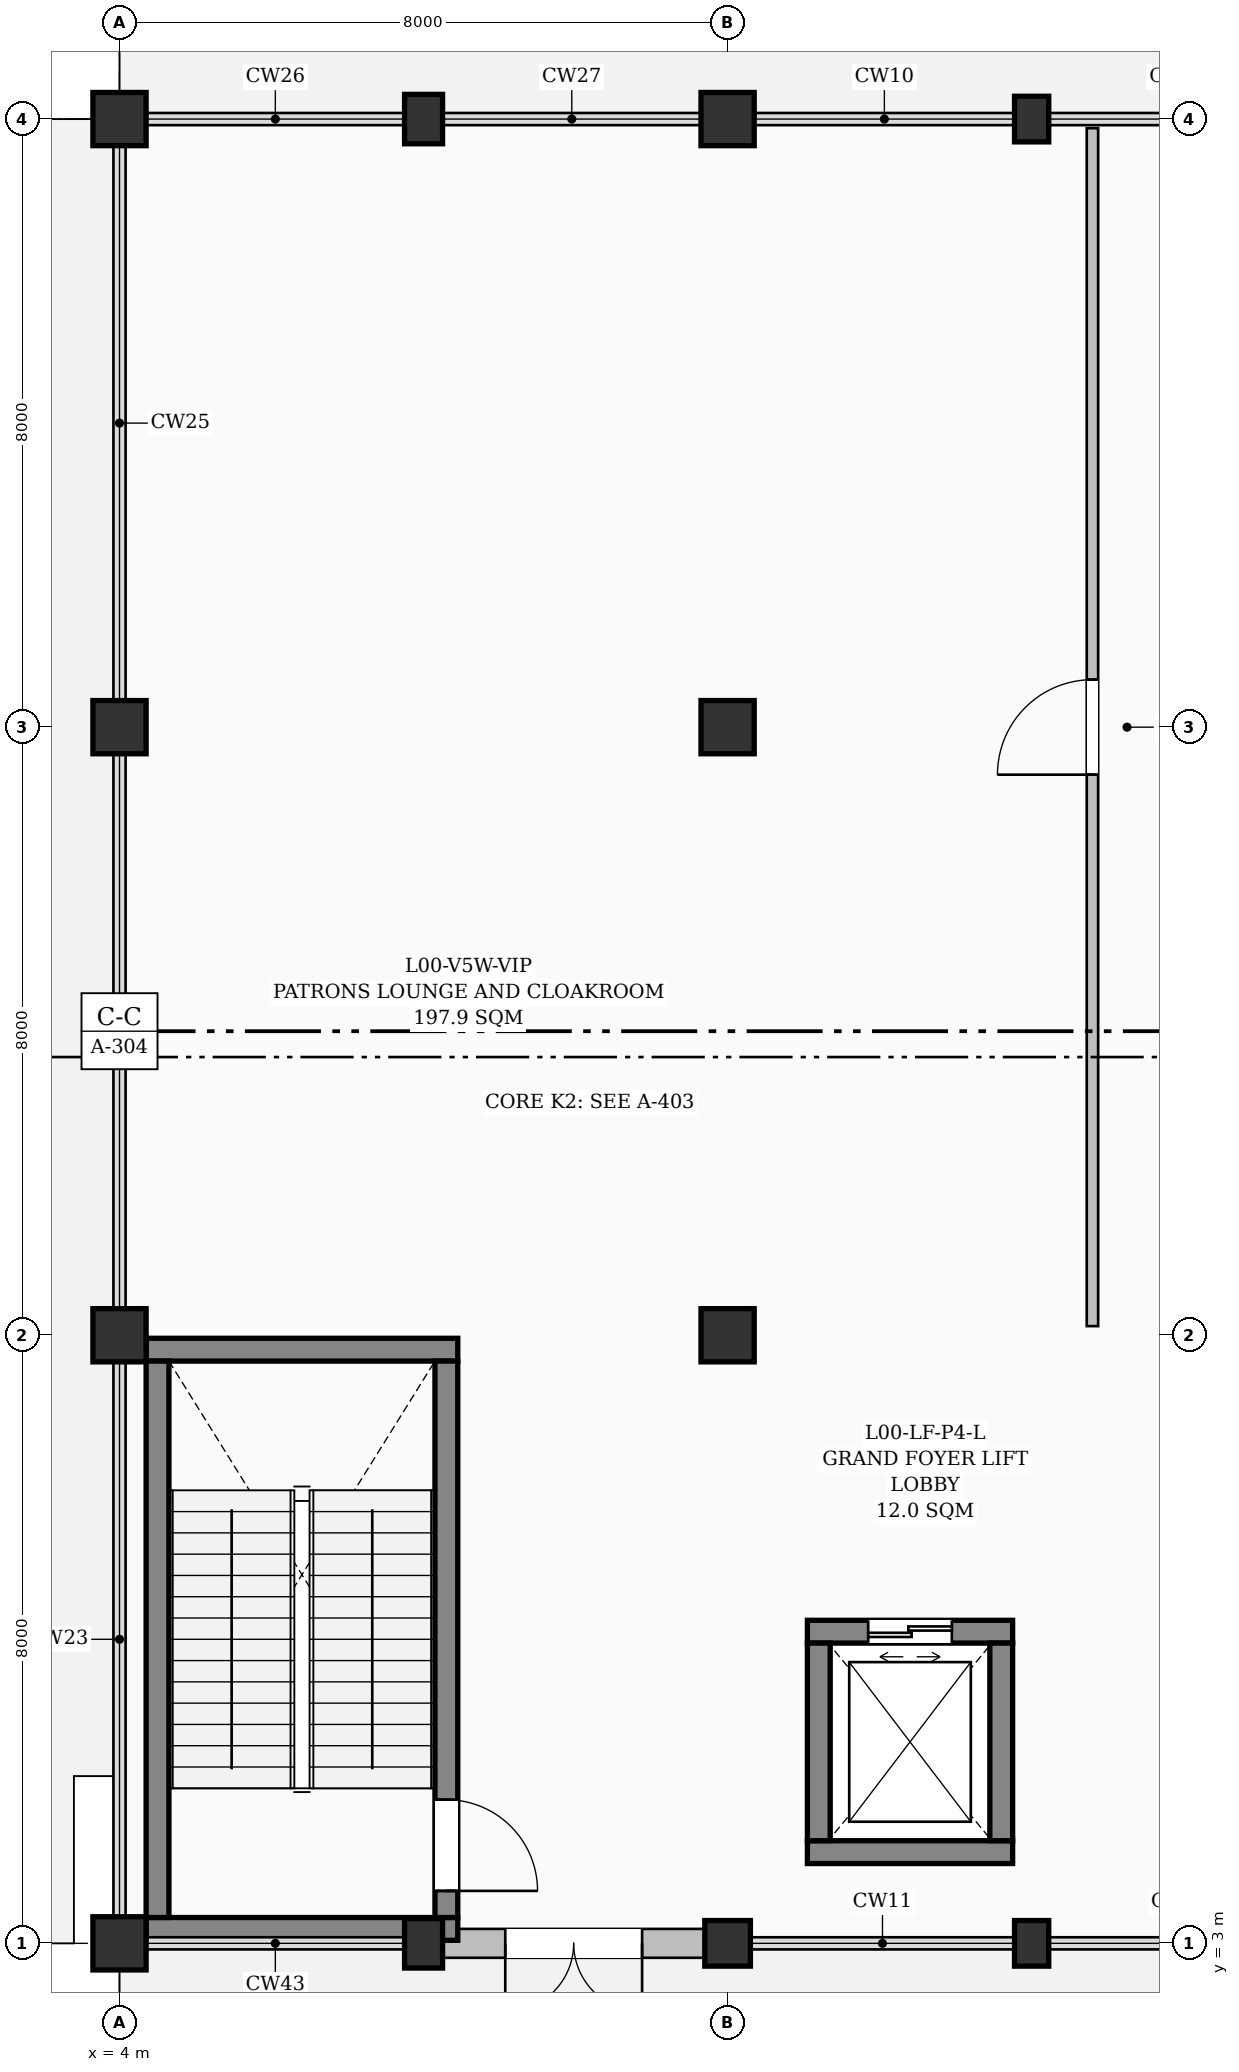
"""IFC4 building model, lengths in metres.
Left out: names, types, materials, properties, quantities, classifications, styles, units other than length and angle.
Written with IfcOpenShell. Run it as: python <this file> out.ifc"""

import sys

from ifc_helpers import new_model, si_unit, direction, frame, frame_2d, origin, origin_2d, place, context, subcontext, project, spatial, rectangle, circle, extrude, element, fill, save


model = new_model("IFC4")
c1 = context("Model", 3, precision=1e-05, world=origin(), true_north=direction((0.0, 1.0)))
c2 = subcontext(c1, "Body", "Model", "MODEL_VIEW")
j1 = project(units=[si_unit("LENGTHUNIT", "METRE"), si_unit("PLANEANGLEUNIT", "RADIAN")], contexts=[c1])
p1 = place(None, origin())
s1 = spatial("IfcSite", under=j1, at=p1, CompositionType="ELEMENT")
p2 = place(p1, origin())
s2 = spatial("IfcBuilding", under=s1, at=p2, CompositionType="ELEMENT")
p3 = place(p2, origin())
s3 = spatial("IfcBuildingStorey", under=s2, at=p3, CompositionType="ELEMENT", Elevation=0.0)
for number, where, z_axis, x_axis in (
    (1, (4.0, 3.0, 0.0), (0.0, 0.0, 1.0), (1.0, 0.0, 0.0)),
    (2, (4.0, 11.0, 0.0), (0.0, 0.0, 1.0), (1.0, 0.0, 0.0)),
    (3, (4.0, 19.0, 0.0), (0.0, 0.0, 1.0), (1.0, 0.0, 0.0)),
    (4, (4.0, 27.0, 0.0), (0.0, 0.0, 1.0), (1.0, 0.0, 0.0)),
):
    element("IfcColumn", number, at=place(p3, frame(where, z_axis=z_axis, x_axis=x_axis)), inside=s3, PredefinedType="COLUMN", context=c2, shape_type="SweptSolid", body=[
        extrude(rectangle(XDim=0.7, YDim=0.7, at=origin_2d()), origin(), (0.0, 0.0, 1.0), 4.8),
    ])
for number, where, z_axis, x_axis in (
    (5, (8.0, 3.0, 0.0), (0.0, 0.0, 1.0), (1.0, 0.0, 0.0)),
    (6, (8.0, 27.0, 0.0), (0.0, 0.0, 1.0), (1.0, 0.0, 0.0)),
):
    element("IfcColumn", number, at=place(p3, frame(where, z_axis=z_axis, x_axis=x_axis)), inside=s3, PredefinedType="PILASTER", context=c2, shape_type="SweptSolid", body=[
        extrude(rectangle(XDim=0.5, YDim=0.65, at=origin_2d()), origin(), (0.0, 0.0, 1.0), 4.8),
    ])
p4 = place(p3, frame((12.0, 3.0, 0.0), z_axis=(0.0, 0.0, 1.0), x_axis=(1.0, 0.0, 0.0)))
e7 = element("IfcColumn", 7, at=p4, inside=s3, PredefinedType="COLUMN", context=c2, shape_type="SweptSolid", body=[
    extrude(circle(Radius=0.3, at=origin_2d()), origin(), (0.0, 0.0, 1.0), 4.8),
])
for number, where, z_axis, x_axis in (
    (8, (12.0, 11.0, 0.0), (0.0, 0.0, 1.0), (1.0, 0.0, 0.0)),
    (9, (12.0, 19.0, 0.0), (0.0, 0.0, 1.0), (1.0, 0.0, 0.0)),
    (10, (12.0, 27.0, 0.0), (0.0, 0.0, 1.0), (1.0, 0.0, 0.0)),
):
    element("IfcColumn", number, at=place(p3, frame(where, z_axis=z_axis, x_axis=x_axis)), inside=s3, PredefinedType="COLUMN", context=c2, shape_type="SweptSolid", body=[
        extrude(rectangle(XDim=0.7, YDim=0.7, at=origin_2d()), origin(), (0.0, 0.0, 1.0), 4.8),
    ])
for number, where, z_axis, x_axis in (
    (11, (16.0, 3.0, 0.0), (0.0, 0.0, 1.0), (1.0, 0.0, 0.0)),
    (12, (16.0, 27.0, 0.0), (0.0, 0.0, 1.0), (1.0, 0.0, 0.0)),
):
    element("IfcColumn", number, at=place(p3, frame(where, z_axis=z_axis, x_axis=x_axis)), inside=s3, PredefinedType="PILASTER", context=c2, shape_type="SweptSolid", body=[
        extrude(rectangle(XDim=0.45, YDim=0.6, at=origin_2d()), origin(), (0.0, 0.0, 1.0), 4.8),
    ])
p5 = place(p3, frame((11.7, 3.0, 0.0), z_axis=(0.0, 0.0, 1.0), x_axis=(-1.0, 0.0, 0.0)))
e13 = element("IfcWall", 13, at=p5, inside=s3, PredefinedType="SOLIDWALL", context=c2, shape_type="SweptSolid", body=[
    extrude(rectangle(XDim=3.45, YDim=0.38, at=frame_2d((1.725, 0.0))), origin(), (0.0, 0.0, 1.0), 4.035),
])
p6 = place(p5, frame((0.825, 0.0, 0.0)))
e14 = element("IfcOpeningElement", 14, at=p6, cuts=e13, PredefinedType="OPENING", context=c2, shape_type="SweptSolid", body=[
    extrude(rectangle(XDim=1.8, YDim=2.25, at=frame_2d((0.9, 1.125))), frame((0.0, 0.2, 0.0), z_axis=(0.0, -1.0, 0.0), x_axis=(1.0, 0.0, 0.0)), (0.0, 0.0, 1.0), 0.4),
])
for number, where, z_axis, x_axis in (
    (15, (4.35, 3.19, 0.0), (0.0, 0.0, 1.0), (1.0, 0.0, 0.0)),
    (16, (8.45, 10.81, 0.0), (0.0, 0.0, 1.0), (-1.0, 0.0, 0.0)),
):
    element("IfcWall", number, at=place(p3, frame(where, z_axis=z_axis, x_axis=x_axis)), inside=s3, PredefinedType="SHEAR", context=c2, shape_type="SweptSolid", body=[
        extrude(rectangle(XDim=4.1, YDim=0.3, at=frame_2d((2.05, 0.0))), origin(), (0.0, 0.0, 1.0), 4.55),
    ])
p7 = place(p3, frame((4.5, 3.34, 0.0), z_axis=(0.0, 0.0, 1.0), x_axis=(0.0, 1.0, 0.0)))
e17 = element("IfcWall", 17, at=p7, inside=s3, PredefinedType="SHEAR", context=c2, shape_type="SweptSolid", body=[
    extrude(rectangle(XDim=7.32, YDim=0.3, at=frame_2d((3.66, 0.0))), origin(), (0.0, 0.0, 1.0), 4.55),
])
p8 = place(p3, frame((8.3, 10.66, 0.0), z_axis=(0.0, 0.0, 1.0), x_axis=(0.0, -1.0, 0.0)))
e18 = element("IfcWall", 18, at=p8, inside=s3, PredefinedType="SHEAR", context=c2, shape_type="SweptSolid", body=[
    extrude(rectangle(XDim=7.32, YDim=0.3, at=frame_2d((3.66, 0.0))), origin(), (0.0, 0.0, 1.0), 4.55),
])
p9 = place(p8, frame((5.77, 0.0, 0.0)))
e19 = element("IfcOpeningElement", 19, at=p9, cuts=e18, PredefinedType="OPENING", context=c2, shape_type="SweptSolid", body=[
    extrude(rectangle(XDim=1.2, YDim=2.15, at=frame_2d((0.6, 1.075))), frame((0.0, 0.16, 0.0), z_axis=(0.0, -1.0, 0.0), x_axis=(1.0, 0.0, 0.0)), (0.0, 0.0, 1.0), 0.32),
])
p10 = place(p3, frame((13.05, 4.2, 0.0), z_axis=(0.0, 0.0, 1.0), x_axis=(1.0, 0.0, 0.0)))
e20 = element("IfcWall", 20, at=p10, inside=s3, PredefinedType="SHEAR", context=c2, shape_type="SweptSolid", body=[
    extrude(rectangle(XDim=2.7, YDim=0.3, at=frame_2d((1.35, 0.0))), origin(), (0.0, 0.0, 1.0), 4.55),
])
p11 = place(p3, frame((15.75, 7.1, 0.0), z_axis=(0.0, 0.0, 1.0), x_axis=(-1.0, 0.0, 0.0)))
e21 = element("IfcWall", 21, at=p11, inside=s3, PredefinedType="SHEAR", context=c2, shape_type="SweptSolid", body=[
    extrude(rectangle(XDim=2.7, YDim=0.3, at=frame_2d((1.35, 0.0))), origin(), (0.0, 0.0, 1.0), 4.55),
])
p12 = place(p11, frame((0.8, 0.0, 0.0)))
e22 = element("IfcOpeningElement", 22, at=p12, cuts=e21, PredefinedType="OPENING", context=c2, shape_type="SweptSolid", body=[
    extrude(rectangle(XDim=1.1, YDim=2.15, at=frame_2d((0.55, 1.075))), frame((0.0, 0.16, 0.0), z_axis=(0.0, -1.0, 0.0), x_axis=(1.0, 0.0, 0.0)), (0.0, 0.0, 1.0), 0.32),
])
for number, where, z_axis, x_axis in (
    (23, (13.2, 4.35, 0.0), (0.0, 0.0, 1.0), (0.0, 1.0, 0.0)),
    (24, (15.6, 6.95, 0.0), (0.0, 0.0, 1.0), (0.0, -1.0, 0.0)),
):
    element("IfcWall", number, at=place(p3, frame(where, z_axis=z_axis, x_axis=x_axis)), inside=s3, PredefinedType="SHEAR", context=c2, shape_type="SweptSolid", body=[
        extrude(rectangle(XDim=2.6, YDim=0.3, at=frame_2d((1.3, 0.0))), origin(), (0.0, 0.0, 1.0), 4.55),
    ])
p13 = place(p3, frame((16.8, 11.12, 0.0), z_axis=(0.0, 0.0, 1.0), x_axis=(0.0, 1.0, 0.0)))
e25 = element("IfcWall", 25, at=p13, inside=s3, PredefinedType="PARTITIONING", context=c2, shape_type="SweptSolid", body=[
    extrude(rectangle(XDim=15.76, YDim=0.15, at=frame_2d((7.88, 0.0))), origin(), (0.0, 0.0, 1.0), 4.55),
])
p14 = place(p13, frame((7.255, 0.0, 0.0)))
e26 = element("IfcOpeningElement", 26, at=p14, cuts=e25, PredefinedType="OPENING", context=c2, shape_type="SweptSolid", body=[
    extrude(rectangle(XDim=1.25, YDim=2.15, at=frame_2d((0.625, 1.075))), frame((0.0, 0.085, 0.0), z_axis=(0.0, -1.0, 0.0), x_axis=(1.0, 0.0, 0.0)), (0.0, 0.0, 1.0), 0.17),
])
p15 = place(p6, origin())
e27 = element("IfcDoor", 27, at=p15, inside=s3, OperationType="DOUBLE_DOOR_SINGLE_SWING", PredefinedType="DOOR", context=c2, shape_type="SweptSolid", body=[
    extrude(rectangle(XDim=1.8, YDim=2.25, at=frame_2d((0.9, 1.125))), frame((0.0, 0.025, 0.0), z_axis=(0.0, -1.0, 0.0), x_axis=(1.0, 0.0, 0.0)), (0.0, 0.0, 1.0), 0.05),
])
fill(e14, e27)
p16 = place(p9, origin())
e28 = element("IfcDoor", 28, at=p16, inside=s3, OperationType="SINGLE_SWING_RIGHT", PredefinedType="DOOR", context=c2, shape_type="SweptSolid", body=[
    extrude(rectangle(XDim=1.2, YDim=2.15, at=frame_2d((0.6, 1.075))), frame((0.0, 0.025, 0.0), z_axis=(0.0, -1.0, 0.0), x_axis=(1.0, 0.0, 0.0)), (0.0, 0.0, 1.0), 0.05),
])
fill(e19, e28)
p17 = place(p12, origin())
e29 = element("IfcDoor", 29, at=p17, inside=s3, OperationType="DOUBLE_DOOR_SLIDING", PredefinedType="DOOR", context=c2, shape_type="SweptSolid", body=[
    extrude(rectangle(XDim=1.1, YDim=2.15, at=frame_2d((0.55, 1.075))), frame((0.0, 0.025, 0.0), z_axis=(0.0, -1.0, 0.0), x_axis=(1.0, 0.0, 0.0)), (0.0, 0.0, 1.0), 0.05),
])
fill(e22, e29)
p18 = place(p14, origin())
e30 = element("IfcDoor", 30, at=p18, inside=s3, OperationType="SINGLE_SWING_LEFT", PredefinedType="DOOR", context=c2, shape_type="SweptSolid", body=[
    extrude(rectangle(XDim=1.25, YDim=2.15, at=frame_2d((0.625, 1.075))), frame((0.0, 0.025, 0.0), z_axis=(0.0, -1.0, 0.0), x_axis=(1.0, 0.0, 0.0)), (0.0, 0.0, 1.0), 0.05),
])
fill(e26, e30)
save(model, sys.argv[1])
